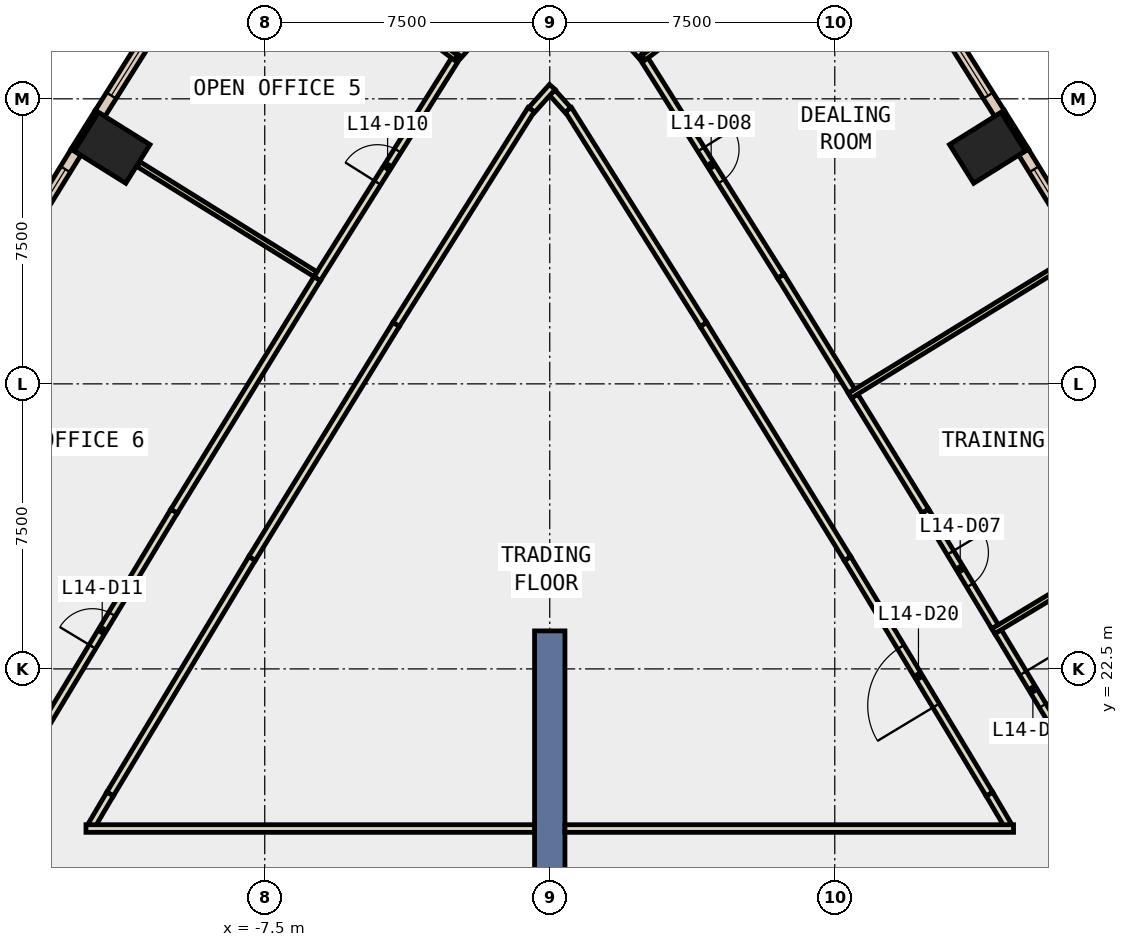
"""IFC4 building model, lengths in metres.
Left out: names, types, materials, properties, quantities, classifications, styles, units other than length and angle.
Written with IfcOpenShell. Run it as: python <this file> out.ifc"""

import sys

from ifc_helpers import new_model, si_unit, direction, frame, frame_2d, origin, origin_2d, place, context, subcontext, project, spatial, rectangle, extrude, element, fill, save


model = new_model("IFC4")
c1 = context("Model", 3, precision=1e-05, world=origin(), true_north=direction((0.0, 1.0)))
c2 = subcontext(c1, "Body", "Model", "MODEL_VIEW")
j1 = project(units=[si_unit("LENGTHUNIT", "METRE"), si_unit("PLANEANGLEUNIT", "RADIAN")], contexts=[c1])
p1 = place(None, origin())
s1 = spatial("IfcSite", under=j1, at=p1, CompositionType="ELEMENT")
p2 = place(p1, origin())
s2 = spatial("IfcBuilding", under=s1, at=p2, CompositionType="ELEMENT")
p3 = place(p2, frame((0.0, 0.0, 68.6)))
s3 = spatial("IfcBuildingStorey", under=s2, at=p3, CompositionType="ELEMENT", Elevation=68.6)
for number, where, z_axis, x_axis in (
    (1, (11.516, 36.211, -0.4), (0.0, 0.0, 1.0), (-0.53, 0.848, 0.0)),
    (2, (-11.516, 36.211, -0.4), (0.0, 0.0, 1.0), (0.53, 0.848, 0.0)),
):
    element("IfcColumn", number, at=place(p3, frame(where, z_axis=z_axis, x_axis=x_axis)), inside=s3, PredefinedType="COLUMN", context=c2, shape_type="SweptSolid", body=[
        extrude(rectangle(XDim=1.2, YDim=1.6, at=origin_2d()), origin(), (0.0, 0.0, 1.0), 4.2),
    ])
p4 = place(p3, frame((0.0, 14.5, -0.4), z_axis=(0.0, 0.0, 1.0), x_axis=(0.0, 1.0, 0.0)))
e3 = element("IfcWall", 3, at=p4, inside=s3, PredefinedType="SHEAR", context=c2, shape_type="SweptSolid", body=[
    extrude(rectangle(XDim=9.0, YDim=0.8, at=frame_2d((4.5, 0.0))), origin(), (0.0, 0.0, 1.0), 4.2),
])
for number, where, z_axis, x_axis in (
    (4, (12.555, 36.153, 0.0), (0.0, 0.0, 1.0), (-0.53, 0.848, 0.0)),
    (5, (-11.919, 37.17, 0.0), (0.0, 0.0, 1.0), (-0.53, -0.848, 0.0)),
):
    element("IfcWall", number, at=place(p3, frame(where, z_axis=z_axis, x_axis=x_axis)), inside=s3, PredefinedType="STANDARD", context=c2, shape_type="SweptSolid", body=[
        extrude(rectangle(XDim=1.199, YDim=0.1, at=frame_2d((0.6, 0.0))), origin(), (0.0, 0.0, 1.0), 3.8),
    ])
p5 = place(p3, frame((15.677, 30.882, 0.0), z_axis=(0.0, 0.0, 1.0), x_axis=(-0.524239751329, 0.851570715282, 0.0)))
e6 = element("IfcWall", 6, at=p5, inside=s3, PredefinedType="STANDARD", context=c2, shape_type="SweptSolid", body=[
    extrude(rectangle(XDim=6.125, YDim=0.3, at=frame_2d((3.062, 0.0))), origin(), (0.0, 0.0, 1.0), 3.8),
])
p6 = place(p5, frame((0.531, 0.0, 0.9)))
e7 = element("IfcOpeningElement", 7, at=p6, cuts=e6, PredefinedType="OPENING", context=c2, shape_type="SweptSolid", body=[
    extrude(rectangle(XDim=2.0, YDim=2.6, at=frame_2d((1.0, 1.3))), frame((0.0, 0.16, 0.0), z_axis=(0.0, -1.0, 0.0), x_axis=(1.0, 0.0, 0.0)), (0.0, 0.0, 1.0), 0.32),
])
p7 = place(p5, frame((3.594, 0.0, 0.9)))
e8 = element("IfcOpeningElement", 8, at=p7, cuts=e6, PredefinedType="OPENING", context=c2, shape_type="SweptSolid", body=[
    extrude(rectangle(XDim=2.0, YDim=2.6, at=frame_2d((1.0, 1.3))), frame((0.0, 0.16, 0.0), z_axis=(0.0, -1.0, 0.0), x_axis=(1.0, 0.0, 0.0)), (0.0, 0.0, 1.0), 0.32),
])
p8 = place(p3, frame((11.833, 37.116, 0.0), z_axis=(0.0, 0.0, 1.0), x_axis=(-0.532322705893, 0.846541515102, 0.0)))
e9 = element("IfcWall", 9, at=p8, inside=s3, PredefinedType="STANDARD", context=c2, shape_type="SweptSolid", body=[
    extrude(rectangle(XDim=6.218, YDim=0.3, at=frame_2d((3.109, 0.0))), origin(), (0.0, 0.0, 1.0), 3.8),
])
p9 = place(p8, frame((0.555, 0.0, 0.9)))
e10 = element("IfcOpeningElement", 10, at=p9, cuts=e9, PredefinedType="OPENING", context=c2, shape_type="SweptSolid", body=[
    extrude(rectangle(XDim=2.0, YDim=2.6, at=frame_2d((1.0, 1.3))), frame((0.0, 0.16, 0.0), z_axis=(0.0, -1.0, 0.0), x_axis=(1.0, 0.0, 0.0)), (0.0, 0.0, 1.0), 0.32),
])
p10 = place(p8, frame((3.664, 0.0, 0.9)))
e11 = element("IfcOpeningElement", 11, at=p10, cuts=e9, PredefinedType="OPENING", context=c2, shape_type="SweptSolid", body=[
    extrude(rectangle(XDim=2.0, YDim=2.6, at=frame_2d((1.0, 1.3))), frame((0.0, 0.16, 0.0), z_axis=(0.0, -1.0, 0.0), x_axis=(1.0, 0.0, 0.0)), (0.0, 0.0, 1.0), 0.32),
])
p11 = place(p3, frame((-8.523, 42.38, 0.0), z_axis=(0.0, 0.0, 1.0), x_axis=(-0.532322705893, -0.846541515102, 0.0)))
e12 = element("IfcWall", 12, at=p11, inside=s3, PredefinedType="STANDARD", context=c2, shape_type="SweptSolid", body=[
    extrude(rectangle(XDim=6.218, YDim=0.3, at=frame_2d((3.109, 0.0))), origin(), (0.0, 0.0, 1.0), 3.8),
])
p12 = place(p11, frame((0.555, 0.0, 0.9)))
e13 = element("IfcOpeningElement", 13, at=p12, cuts=e12, PredefinedType="OPENING", context=c2, shape_type="SweptSolid", body=[
    extrude(rectangle(XDim=2.0, YDim=2.6, at=frame_2d((1.0, 1.3))), frame((0.0, 0.16, 0.0), z_axis=(0.0, -1.0, 0.0), x_axis=(1.0, 0.0, 0.0)), (0.0, 0.0, 1.0), 0.32),
])
p13 = place(p11, frame((3.664, 0.0, 0.9)))
e14 = element("IfcOpeningElement", 14, at=p13, cuts=e12, PredefinedType="OPENING", context=c2, shape_type="SweptSolid", body=[
    extrude(rectangle(XDim=2.0, YDim=2.6, at=frame_2d((1.0, 1.3))), frame((0.0, 0.16, 0.0), z_axis=(0.0, -1.0, 0.0), x_axis=(1.0, 0.0, 0.0)), (0.0, 0.0, 1.0), 0.32),
])
p14 = place(p3, frame((-12.466, 36.098, 0.0), z_axis=(0.0, 0.0, 1.0), x_axis=(-0.524239751329, -0.851570715282, 0.0)))
e15 = element("IfcWall", 15, at=p14, inside=s3, PredefinedType="STANDARD", context=c2, shape_type="SweptSolid", body=[
    extrude(rectangle(XDim=6.125, YDim=0.3, at=frame_2d((3.062, 0.0))), origin(), (0.0, 0.0, 1.0), 3.8),
])
p15 = place(p14, frame((0.531, 0.0, 0.9)))
e16 = element("IfcOpeningElement", 16, at=p15, cuts=e15, PredefinedType="OPENING", context=c2, shape_type="SweptSolid", body=[
    extrude(rectangle(XDim=2.0, YDim=2.6, at=frame_2d((1.0, 1.3))), frame((0.0, 0.16, 0.0), z_axis=(0.0, -1.0, 0.0), x_axis=(1.0, 0.0, 0.0)), (0.0, 0.0, 1.0), 0.32),
])
p16 = place(p14, frame((3.594, 0.0, 0.9)))
e17 = element("IfcOpeningElement", 17, at=p16, cuts=e15, PredefinedType="OPENING", context=c2, shape_type="SweptSolid", body=[
    extrude(rectangle(XDim=2.0, YDim=2.6, at=frame_2d((1.0, 1.3))), frame((0.0, 0.16, 0.0), z_axis=(0.0, -1.0, 0.0), x_axis=(1.0, 0.0, 0.0)), (0.0, 0.0, 1.0), 0.32),
])
p17 = place(p3, frame((12.054, 18.386, 0.0), z_axis=(0.0, 0.0, 1.0), x_axis=(-0.508048285953, 0.861328589529, 0.0)))
e18 = element("IfcWall", 18, at=p17, inside=s3, PredefinedType="PARTITIONING", context=c2, shape_type="SweptSolid", body=[
    extrude(rectangle(XDim=0.954, YDim=0.2, at=frame_2d((0.477, 0.0))), origin(), (0.0, 0.0, 1.0), 3.8),
])
p18 = place(p3, frame((11.569, 19.208, 0.0), z_axis=(0.0, 0.0, 1.0), x_axis=(-0.516172233954, 0.85648480716, 0.0)))
e19 = element("IfcWall", 19, at=p18, inside=s3, PredefinedType="PARTITIONING", context=c2, shape_type="SweptSolid", body=[
    extrude(rectangle(XDim=7.234, YDim=0.2, at=frame_2d((3.617, 0.0))), origin(), (0.0, 0.0, 1.0), 3.8),
])
p19 = place(p18, frame((2.717, 0.0, 0.0)))
e20 = element("IfcOpeningElement", 20, at=p19, cuts=e19, PredefinedType="OPENING", context=c2, shape_type="SweptSolid", body=[
    extrude(rectangle(XDim=1.8, YDim=2.1, at=frame_2d((0.9, 1.05))), frame((0.0, 0.11, 0.0), z_axis=(0.0, -1.0, 0.0), x_axis=(1.0, 0.0, 0.0)), (0.0, 0.0, 1.0), 0.22),
])
p20 = place(p3, frame((7.835, 25.404, 0.0), z_axis=(0.0, 0.0, 1.0), x_axis=(-0.524225471951, 0.851579505717, 0.0)))
e21 = element("IfcWall", 21, at=p20, inside=s3, PredefinedType="PARTITIONING", context=c2, shape_type="SweptSolid", body=[
    extrude(rectangle(XDim=7.233, YDim=0.2, at=frame_2d((3.617, 0.0))), origin(), (0.0, 0.0, 1.0), 3.8),
])
p21 = place(p3, frame((4.043, 31.564, 0.0), z_axis=(0.0, 0.0, 1.0), x_axis=(-0.532301094997, 0.846555104092, 0.0)))
e22 = element("IfcWall", 22, at=p21, inside=s3, PredefinedType="PARTITIONING", context=c2, shape_type="SweptSolid", body=[
    extrude(rectangle(XDim=6.677, YDim=0.2, at=frame_2d((3.338, 0.0))), origin(), (0.0, 0.0, 1.0), 3.8),
])
p22 = place(p3, frame((0.476, 37.206, 0.0), z_axis=(0.0, 0.0, 1.0), x_axis=(-0.667027496744, 0.745033098988, 0.0)))
e23 = element("IfcWall", 23, at=p22, inside=s3, PredefinedType="PARTITIONING", context=c2, shape_type="SweptSolid", body=[
    extrude(rectangle(XDim=0.614, YDim=0.2, at=frame_2d((0.307, 0.0))), origin(), (0.0, 0.0, 1.0), 3.8),
])
p23 = place(p3, frame((0.067, 37.812, 0.0), z_axis=(0.0, 0.0, 1.0), x_axis=(-0.667338487106, -0.744754552606, 0.0)))
e24 = element("IfcWall", 24, at=p23, inside=s3, PredefinedType="PARTITIONING", context=c2, shape_type="SweptSolid", body=[
    extrude(rectangle(XDim=0.814, YDim=0.2, at=frame_2d((0.407, 0.0))), origin(), (0.0, 0.0, 1.0), 3.8),
])
p24 = place(p3, frame((-0.489, 37.216, 0.0), z_axis=(0.0, 0.0, 1.0), x_axis=(-0.532301094997, -0.846555104092, 0.0)))
e25 = element("IfcWall", 25, at=p24, inside=s3, PredefinedType="PARTITIONING", context=c2, shape_type="SweptSolid", body=[
    extrude(rectangle(XDim=6.677, YDim=0.2, at=frame_2d((3.338, 0.0))), origin(), (0.0, 0.0, 1.0), 3.8),
])
p25 = place(p3, frame((-4.043, 31.564, 0.0), z_axis=(0.0, 0.0, 1.0), x_axis=(-0.524225471951, -0.851579505717, 0.0)))
e26 = element("IfcWall", 26, at=p25, inside=s3, PredefinedType="PARTITIONING", context=c2, shape_type="SweptSolid", body=[
    extrude(rectangle(XDim=7.233, YDim=0.2, at=frame_2d((3.617, 0.0))), origin(), (0.0, 0.0, 1.0), 3.8),
])
p26 = place(p3, frame((-7.835, 25.404, 0.0), z_axis=(0.0, 0.0, 1.0), x_axis=(-0.516172233954, -0.85648480716, 0.0)))
e27 = element("IfcWall", 27, at=p26, inside=s3, PredefinedType="PARTITIONING", context=c2, shape_type="SweptSolid", body=[
    extrude(rectangle(XDim=7.234, YDim=0.2, at=frame_2d((3.617, 0.0))), origin(), (0.0, 0.0, 1.0), 3.8),
])
p27 = place(p3, frame((-11.569, 19.208, 0.0), z_axis=(0.0, 0.0, 1.0), x_axis=(-0.508048285953, -0.861328589529, 0.0)))
e28 = element("IfcWall", 28, at=p27, inside=s3, PredefinedType="PARTITIONING", context=c2, shape_type="SweptSolid", body=[
    extrude(rectangle(XDim=0.954, YDim=0.2, at=frame_2d((0.477, 0.0))), origin(), (0.0, 0.0, 1.0), 3.8),
])
p28 = place(p3, frame((11.796, 23.481, 0.0), z_axis=(0.0, 0.0, 1.0), x_axis=(0.516070934647, -0.8565458484, 0.0)))
e29 = element("IfcWall", 29, at=p28, inside=s3, PredefinedType="PARTITIONING", context=c2, shape_type="SweptSolid", body=[
    extrude(rectangle(XDim=3.554, YDim=0.2, at=frame_2d((1.777, 0.0))), origin(), (0.0, 0.0, 1.0), 3.8),
])
p29 = place(p28, frame((1.277, 0.0, 0.0)))
e30 = element("IfcOpeningElement", 30, at=p29, cuts=e29, PredefinedType="OPENING", context=c2, shape_type="SweptSolid", body=[
    extrude(rectangle(XDim=1.0, YDim=2.1, at=frame_2d((0.5, 1.05))), frame((0.0, 0.11, 0.0), z_axis=(0.0, -1.0, 0.0), x_axis=(1.0, 0.0, 0.0)), (0.0, 0.0, 1.0), 0.22),
])
p30 = place(p3, frame((8.022, 29.678, 0.0), z_axis=(0.0, 0.0, 1.0), x_axis=(0.524093591744, -0.851660676029, 0.0)))
e31 = element("IfcWall", 31, at=p30, inside=s3, PredefinedType="PARTITIONING", context=c2, shape_type="SweptSolid", body=[
    extrude(rectangle(XDim=3.553, YDim=0.2, at=frame_2d((1.776, 0.0))), origin(), (0.0, 0.0, 1.0), 3.8),
])
p31 = place(p3, frame((9.884, 26.652, 0.0), z_axis=(0.0, 0.0, 1.0), x_axis=(0.516162051318, -0.856490943781, 0.0)))
e32 = element("IfcWall", 32, at=p31, inside=s3, PredefinedType="PARTITIONING", context=c2, shape_type="SweptSolid", body=[
    extrude(rectangle(XDim=3.553, YDim=0.2, at=frame_2d((1.777, 0.0))), origin(), (0.0, 0.0, 1.0), 3.8),
])
p32 = place(p31, frame((1.277, 0.0, 0.0)))
e33 = element("IfcOpeningElement", 33, at=p32, cuts=e32, PredefinedType="OPENING", context=c2, shape_type="SweptSolid", body=[
    extrude(rectangle(XDim=1.0, YDim=2.1, at=frame_2d((0.5, 1.05))), frame((0.0, 0.11, 0.0), z_axis=(0.0, -1.0, 0.0), x_axis=(1.0, 0.0, 0.0)), (0.0, 0.0, 1.0), 0.22),
])
p33 = place(p3, frame((2.413, 38.665, 0.0), z_axis=(0.0, 0.0, 1.0), x_axis=(0.532328273879, -0.846538013812, 0.0)))
e34 = element("IfcWall", 34, at=p33, inside=s3, PredefinedType="PARTITIONING", context=c2, shape_type="SweptSolid", body=[
    extrude(rectangle(XDim=6.89, YDim=0.2, at=frame_2d((3.445, 0.0))), origin(), (0.0, 0.0, 1.0), 3.8),
])
p34 = place(p33, frame((2.945, 0.0, 0.0)))
e35 = element("IfcOpeningElement", 35, at=p34, cuts=e34, PredefinedType="OPENING", context=c2, shape_type="SweptSolid", body=[
    extrude(rectangle(XDim=1.0, YDim=2.1, at=frame_2d((0.5, 1.05))), frame((0.0, 0.11, 0.0), z_axis=(0.0, -1.0, 0.0), x_axis=(1.0, 0.0, 0.0)), (0.0, 0.0, 1.0), 0.22),
])
p35 = place(p3, frame((6.081, 32.832, 0.0), z_axis=(0.0, 0.0, 1.0), x_axis=(0.524062922014, -0.851679548756, 0.0)))
e36 = element("IfcWall", 36, at=p35, inside=s3, PredefinedType="PARTITIONING", context=c2, shape_type="SweptSolid", body=[
    extrude(rectangle(XDim=3.553, YDim=0.2, at=frame_2d((1.777, 0.0))), origin(), (0.0, 0.0, 1.0), 3.8),
])
p36 = place(p3, frame((-2.4, 38.655, 0.0), z_axis=(0.0, 0.0, 1.0), x_axis=(0.666791730919, 0.745244112743, 0.0)))
e37 = element("IfcWall", 37, at=p36, inside=s3, PredefinedType="PARTITIONING", context=c2, shape_type="SweptSolid", body=[
    extrude(rectangle(XDim=2.281, YDim=0.2, at=frame_2d((1.141, 0.0))), origin(), (0.0, 0.0, 1.0), 3.8),
])
p37 = place(p36, frame((0.641, 0.0, 0.0)))
e38 = element("IfcOpeningElement", 38, at=p37, cuts=e37, PredefinedType="OPENING", context=c2, shape_type="SweptSolid", body=[
    extrude(rectangle(XDim=1.0, YDim=2.1, at=frame_2d((0.5, 1.05))), frame((0.0, 0.11, 0.0), z_axis=(0.0, -1.0, 0.0), x_axis=(1.0, 0.0, 0.0)), (0.0, 0.0, 1.0), 0.22),
])
p38 = place(p3, frame((0.879, 40.355, 0.0), z_axis=(0.0, 0.0, 1.0), x_axis=(0.666791730919, -0.745244112743, 0.0)))
e39 = element("IfcWall", 39, at=p38, inside=s3, PredefinedType="PARTITIONING", context=c2, shape_type="SweptSolid", body=[
    extrude(rectangle(XDim=2.281, YDim=0.2, at=frame_2d((1.141, 0.0))), origin(), (0.0, 0.0, 1.0), 3.8),
])
p39 = place(p3, frame((-6.121, 32.768, 0.0), z_axis=(0.0, 0.0, 1.0), x_axis=(0.532309351336, 0.846549912574, 0.0)))
e40 = element("IfcWall", 40, at=p39, inside=s3, PredefinedType="PARTITIONING", context=c2, shape_type="SweptSolid", body=[
    extrude(rectangle(XDim=6.966, YDim=0.2, at=frame_2d((3.483, 0.0))), origin(), (0.0, 0.0, 1.0), 3.8),
])
p40 = place(p39, frame((2.983, 0.0, 0.0)))
e41 = element("IfcOpeningElement", 41, at=p40, cuts=e40, PredefinedType="OPENING", context=c2, shape_type="SweptSolid", body=[
    extrude(rectangle(XDim=1.0, YDim=2.1, at=frame_2d((0.5, 1.05))), frame((0.0, 0.11, 0.0), z_axis=(0.0, -1.0, 0.0), x_axis=(1.0, 0.0, 0.0)), (0.0, 0.0, 1.0), 0.22),
])
p41 = place(p3, frame((-13.669, 20.373, 0.0), z_axis=(0.0, 0.0, 1.0), x_axis=(0.516247820136, 0.85643924957, 0.0)))
e42 = element("IfcWall", 42, at=p41, inside=s3, PredefinedType="PARTITIONING", context=c2, shape_type="SweptSolid", body=[
    extrude(rectangle(XDim=7.332, YDim=0.2, at=frame_2d((3.666, 0.0))), origin(), (0.0, 0.0, 1.0), 3.8),
])
p42 = place(p41, frame((3.166, 0.0, 0.0)))
e43 = element("IfcOpeningElement", 43, at=p42, cuts=e42, PredefinedType="OPENING", context=c2, shape_type="SweptSolid", body=[
    extrude(rectangle(XDim=1.0, YDim=2.1, at=frame_2d((0.5, 1.05))), frame((0.0, 0.11, 0.0), z_axis=(0.0, -1.0, 0.0), x_axis=(1.0, 0.0, 0.0)), (0.0, 0.0, 1.0), 0.22),
])
p43 = place(p3, frame((-9.884, 26.652, 0.0), z_axis=(0.0, 0.0, 1.0), x_axis=(0.524182788618, 0.851605779758, 0.0)))
e44 = element("IfcWall", 44, at=p43, inside=s3, PredefinedType="PARTITIONING", context=c2, shape_type="SweptSolid", body=[
    extrude(rectangle(XDim=7.18, YDim=0.2, at=frame_2d((3.59, 0.0))), origin(), (0.0, 0.0, 1.0), 3.8),
])
p44 = place(p3, frame((-12.204, 18.3, 0.0), z_axis=(0.0, 0.0, 1.0), x_axis=(1.0, 0.0, 0.0)))
e45 = element("IfcWall", 45, at=p44, inside=s3, PredefinedType="PARTITIONING", context=c2, shape_type="SweptSolid", body=[
    extrude(rectangle(XDim=11.804, YDim=0.2, at=frame_2d((5.902, 0.0))), origin(), (0.0, 0.0, 1.0), 3.8),
])
p45 = place(p3, frame((11.672, 23.493, 0.0), z_axis=(0.0, 0.0, 1.0), x_axis=(0.856462653555, 0.516208991656, 0.0)))
e46 = element("IfcWall", 46, at=p45, inside=s3, PredefinedType="PARTITIONING", context=c2, shape_type="SweptSolid", body=[
    extrude(rectangle(XDim=7.1, YDim=0.15, at=frame_2d((3.55, 0.0))), origin(), (0.0, 0.0, 1.0), 3.8),
])
p46 = place(p3, frame((7.897, 29.69, 0.0), z_axis=(0.0, 0.0, 1.0), x_axis=(0.851604009471, 0.524185664677, 0.0)))
e47 = element("IfcWall", 47, at=p46, inside=s3, PredefinedType="PARTITIONING", context=c2, shape_type="SweptSolid", body=[
    extrude(rectangle(XDim=7.101, YDim=0.15, at=frame_2d((3.55, 0.0))), origin(), (0.0, 0.0, 1.0), 3.8),
])
for number, where, z_axis, x_axis in (
    (48, (2.466, 38.58, 0.0), (0.0, 0.0, 1.0), (0.799, 0.602, 0.0)),
    (49, (-2.466, 38.58, 0.0), (0.0, 0.0, 1.0), (-0.799, 0.602, 0.0)),
):
    element("IfcWall", number, at=place(p3, frame(where, z_axis=z_axis, x_axis=x_axis)), inside=s3, PredefinedType="PARTITIONING", context=c2, shape_type="SweptSolid", body=[
        extrude(rectangle(XDim=5.605, YDim=0.15, at=frame_2d((2.802, 0.0))), origin(), (0.0, 0.0, 1.0), 3.8),
    ])
p47 = place(p3, frame((-6.166, 32.885, 0.0), z_axis=(0.0, 0.0, 1.0), x_axis=(-0.84915518202, 0.528143424506, 0.0)))
e50 = element("IfcWall", 50, at=p47, inside=s3, PredefinedType="PARTITIONING", context=c2, shape_type="SweptSolid", body=[
    extrude(rectangle(XDim=5.48, YDim=0.15, at=frame_2d((2.74, 0.0))), origin(), (0.0, 0.0, 1.0), 3.8),
])
p48 = place(p3, frame((0.4, 18.3, 0.0), z_axis=(0.0, 0.0, 1.0), x_axis=(1.0, 0.0, 0.0)))
e51 = element("IfcWall", 51, at=p48, inside=s3, PredefinedType="PARTITIONING", context=c2, shape_type="SweptSolid", body=[
    extrude(rectangle(XDim=11.804, YDim=0.2, at=frame_2d((5.902, 0.0))), origin(), (0.0, 0.0, 1.0), 3.8),
])
p49 = place(p7, origin())
e52 = element("IfcWindow", 52, at=p49, inside=s3, PartitioningType="SINGLE_PANEL", PredefinedType="WINDOW", context=c2, shape_type="SweptSolid", body=[
    extrude(rectangle(XDim=2.0, YDim=2.6, at=frame_2d((1.0, 1.3))), frame((0.0, 0.03, 0.0), z_axis=(0.0, -1.0, 0.0), x_axis=(1.0, 0.0, 0.0)), (0.0, 0.0, 1.0), 0.06),
])
fill(e8, e52)
p50 = place(p9, origin())
e53 = element("IfcWindow", 53, at=p50, inside=s3, PartitioningType="SINGLE_PANEL", PredefinedType="WINDOW", context=c2, shape_type="SweptSolid", body=[
    extrude(rectangle(XDim=2.0, YDim=2.6, at=frame_2d((1.0, 1.3))), frame((0.0, 0.03, 0.0), z_axis=(0.0, -1.0, 0.0), x_axis=(1.0, 0.0, 0.0)), (0.0, 0.0, 1.0), 0.06),
])
fill(e10, e53)
p51 = place(p13, origin())
e54 = element("IfcWindow", 54, at=p51, inside=s3, PartitioningType="SINGLE_PANEL", PredefinedType="WINDOW", context=c2, shape_type="SweptSolid", body=[
    extrude(rectangle(XDim=2.0, YDim=2.6, at=frame_2d((1.0, 1.3))), frame((0.0, 0.03, 0.0), z_axis=(0.0, -1.0, 0.0), x_axis=(1.0, 0.0, 0.0)), (0.0, 0.0, 1.0), 0.06),
])
fill(e14, e54)
p52 = place(p15, origin())
e55 = element("IfcWindow", 55, at=p52, inside=s3, PartitioningType="SINGLE_PANEL", PredefinedType="WINDOW", context=c2, shape_type="SweptSolid", body=[
    extrude(rectangle(XDim=2.0, YDim=2.6, at=frame_2d((1.0, 1.3))), frame((0.0, 0.03, 0.0), z_axis=(0.0, -1.0, 0.0), x_axis=(1.0, 0.0, 0.0)), (0.0, 0.0, 1.0), 0.06),
])
fill(e16, e55)
p53 = place(p29, origin())
e56 = element("IfcDoor", 56, at=p53, inside=s3, OperationType="SINGLE_SWING_LEFT", PredefinedType="DOOR", context=c2, shape_type="SweptSolid", body=[
    extrude(rectangle(XDim=1.0, YDim=2.1, at=frame_2d((0.5, 1.05))), frame((0.0, 0.025, 0.0), z_axis=(0.0, -1.0, 0.0), x_axis=(1.0, 0.0, 0.0)), (0.0, 0.0, 1.0), 0.05),
])
fill(e30, e56)
p54 = place(p32, origin())
e57 = element("IfcDoor", 57, at=p54, inside=s3, OperationType="SINGLE_SWING_LEFT", PredefinedType="DOOR", context=c2, shape_type="SweptSolid", body=[
    extrude(rectangle(XDim=1.0, YDim=2.1, at=frame_2d((0.5, 1.05))), frame((0.0, 0.025, 0.0), z_axis=(0.0, -1.0, 0.0), x_axis=(1.0, 0.0, 0.0)), (0.0, 0.0, 1.0), 0.05),
])
fill(e33, e57)
p55 = place(p34, origin())
e58 = element("IfcDoor", 58, at=p55, inside=s3, OperationType="SINGLE_SWING_LEFT", PredefinedType="DOOR", context=c2, shape_type="SweptSolid", body=[
    extrude(rectangle(XDim=1.0, YDim=2.1, at=frame_2d((0.5, 1.05))), frame((0.0, 0.025, 0.0), z_axis=(0.0, -1.0, 0.0), x_axis=(1.0, 0.0, 0.0)), (0.0, 0.0, 1.0), 0.05),
])
fill(e35, e58)
p56 = place(p40, origin())
e59 = element("IfcDoor", 59, at=p56, inside=s3, OperationType="SINGLE_SWING_LEFT", PredefinedType="DOOR", context=c2, shape_type="SweptSolid", body=[
    extrude(rectangle(XDim=1.0, YDim=2.1, at=frame_2d((0.5, 1.05))), frame((0.0, 0.025, 0.0), z_axis=(0.0, -1.0, 0.0), x_axis=(1.0, 0.0, 0.0)), (0.0, 0.0, 1.0), 0.05),
])
fill(e41, e59)
p57 = place(p42, origin())
e60 = element("IfcDoor", 60, at=p57, inside=s3, OperationType="SINGLE_SWING_LEFT", PredefinedType="DOOR", context=c2, shape_type="SweptSolid", body=[
    extrude(rectangle(XDim=1.0, YDim=2.1, at=frame_2d((0.5, 1.05))), frame((0.0, 0.025, 0.0), z_axis=(0.0, -1.0, 0.0), x_axis=(1.0, 0.0, 0.0)), (0.0, 0.0, 1.0), 0.05),
])
fill(e43, e60)
p58 = place(p19, origin())
e61 = element("IfcDoor", 61, at=p58, inside=s3, OperationType="DOUBLE_DOOR_SINGLE_SWING", PredefinedType="DOOR", context=c2, shape_type="SweptSolid", body=[
    extrude(rectangle(XDim=1.8, YDim=2.1, at=frame_2d((0.9, 1.05))), frame((0.0, 0.025, 0.0), z_axis=(0.0, -1.0, 0.0), x_axis=(1.0, 0.0, 0.0)), (0.0, 0.0, 1.0), 0.05),
])
fill(e20, e61)
save(model, sys.argv[1])
